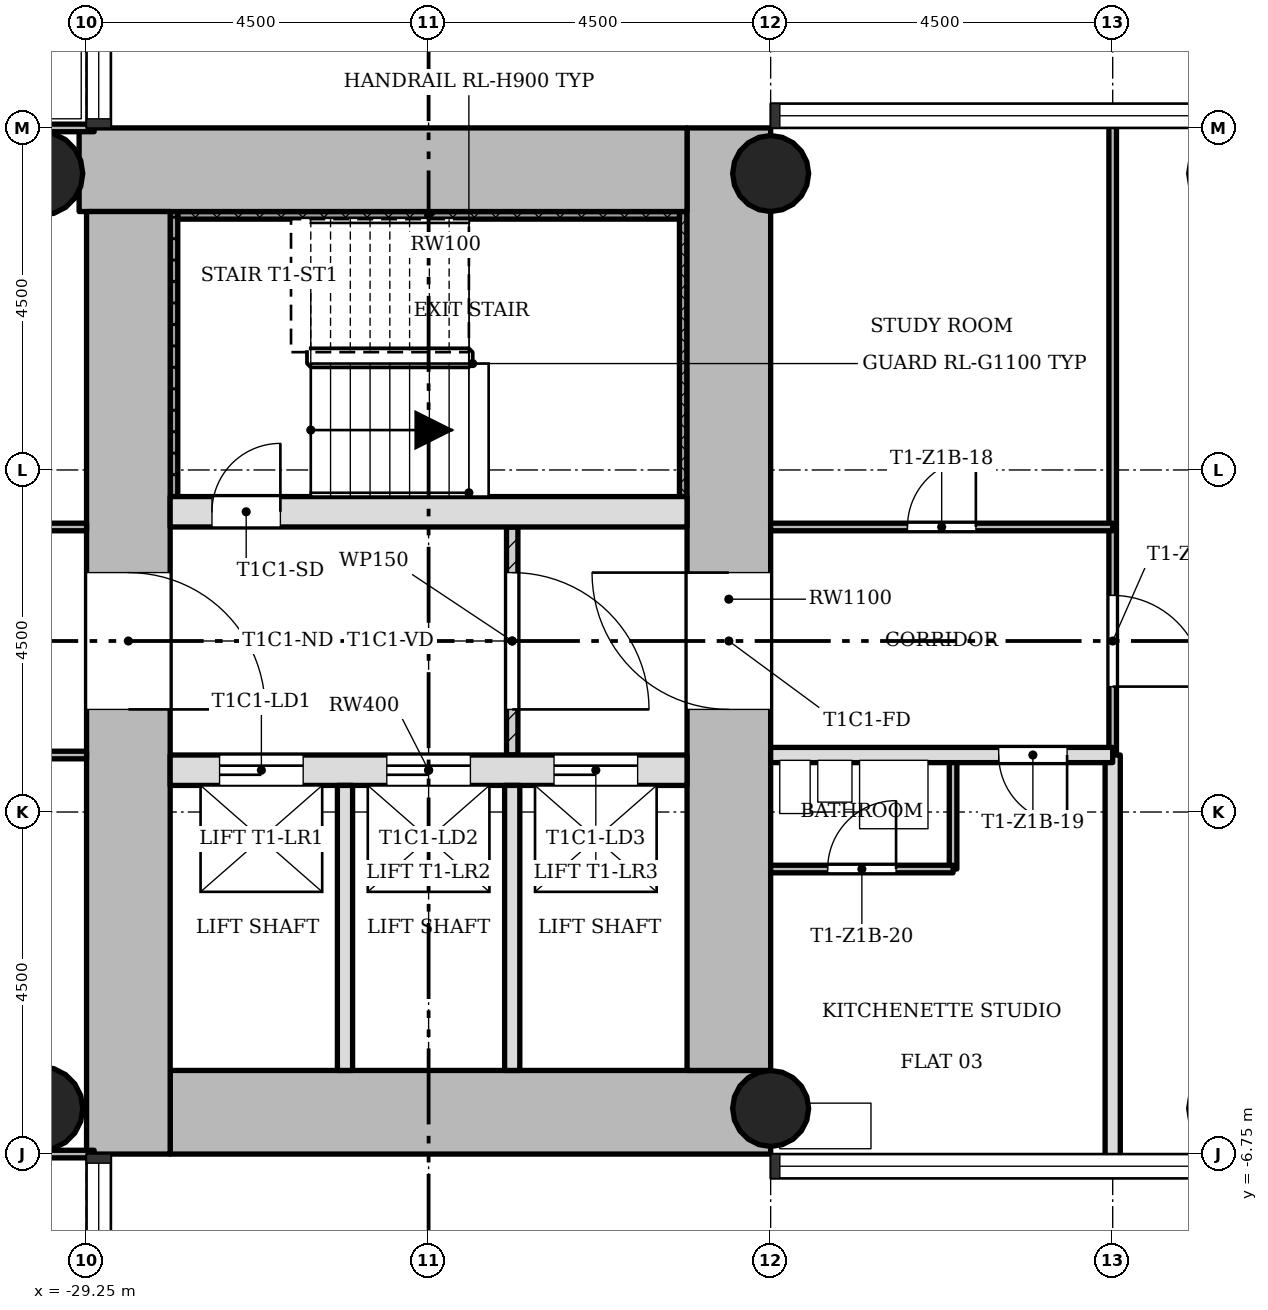
"""IFC4 building model, lengths in metres.
Left out: names, types, materials, properties, quantities, classifications, styles, units other than length and angle.
Written with IfcOpenShell. Run it as: python <this file> out.ifc"""

import sys

from ifc_helpers import new_model, si_unit, direction, frame, frame_2d, origin, origin_2d, place, context, subcontext, project, spatial, rectangle, hollow_circle, extrude, element, fill, save


model = new_model("IFC4")
c1 = context("Model", 3, precision=1e-05, world=origin(), true_north=direction((0.0, 1.0)))
c2 = subcontext(c1, "Body", "Model", "MODEL_VIEW")
j1 = project(units=[si_unit("LENGTHUNIT", "METRE"), si_unit("PLANEANGLEUNIT", "RADIAN")], contexts=[c1])
p1 = place(None, origin())
s1 = spatial("IfcSite", under=j1, at=p1, CompositionType="ELEMENT")
p2 = place(p1, origin())
s2 = spatial("IfcBuilding", under=s1, at=p2, CompositionType="ELEMENT")
p3 = place(p2, frame((0.0, 0.0, 34.7)))
s3 = spatial("IfcBuildingStorey", under=s2, at=p3, CompositionType="ELEMENT", Elevation=34.7)
p4 = place(p3, frame((-28.15, -6.2, 0.0), z_axis=(0.0, 0.0, 1.0), x_axis=(1.0, 0.0, 0.0)))
e1 = element("IfcWall", 1, at=p4, inside=s3, PredefinedType="SHEAR", context=c2, shape_type="SweptSolid", body=[
    extrude(rectangle(XDim=7.9, YDim=1.1, at=frame_2d((3.95, 0.0))), origin(), (0.0, 0.0, 1.0), 3.4),
])
p5 = place(p3, frame((-20.8, -5.65, 0.0), z_axis=(0.0, 0.0, 1.0), x_axis=(0.0, 1.0, 0.0)))
e2 = element("IfcWall", 2, at=p5, inside=s3, PredefinedType="SHEAR", context=c2, shape_type="SweptSolid", body=[
    extrude(rectangle(XDim=12.4, YDim=1.1, at=frame_2d((6.2, 0.0))), origin(), (0.0, 0.0, 1.0), 3.4),
])
p6 = place(p5, frame((4.75, 0.0, 0.0)))
e3 = element("IfcOpeningElement", 3, at=p6, cuts=e2, PredefinedType="OPENING", context=c2, shape_type="SweptSolid", body=[
    extrude(rectangle(XDim=1.8, YDim=2.1, at=frame_2d((0.9, 1.05))), frame((0.0, 0.56, 0.0), z_axis=(0.0, -1.0, 0.0), x_axis=(1.0, 0.0, 0.0)), (0.0, 0.0, 1.0), 1.12),
])
p7 = place(p3, frame((-21.35, 6.2, 0.0), z_axis=(0.0, 0.0, 1.0), x_axis=(-1.0, 0.0, 0.0)))
e4 = element("IfcWall", 4, at=p7, inside=s3, PredefinedType="SHEAR", context=c2, shape_type="SweptSolid", body=[
    extrude(rectangle(XDim=7.998, YDim=1.1, at=frame_2d((3.999, 0.0))), origin(), (0.0, 0.0, 1.0), 3.4),
])
p8 = place(p3, frame((-28.7, 5.65, 0.0), z_axis=(0.0, 0.0, 1.0), x_axis=(0.0, -1.0, 0.0)))
e5 = element("IfcWall", 5, at=p8, inside=s3, PredefinedType="SHEAR", context=c2, shape_type="SweptSolid", body=[
    extrude(rectangle(XDim=12.4, YDim=1.1, at=frame_2d((6.2, 0.0))), origin(), (0.0, 0.0, 1.0), 3.4),
])
p9 = place(p8, frame((4.75, 0.0, 0.0)))
e6 = element("IfcOpeningElement", 6, at=p9, cuts=e5, PredefinedType="OPENING", context=c2, shape_type="SweptSolid", body=[
    extrude(rectangle(XDim=1.8, YDim=2.1, at=frame_2d((0.9, 1.05))), frame((0.0, 0.56, 0.0), z_axis=(0.0, -1.0, 0.0), x_axis=(1.0, 0.0, 0.0)), (0.0, 0.0, 1.0), 1.12),
])
p10 = place(p3, frame((-28.15, -1.7, 0.0), z_axis=(0.0, 0.0, 1.0), x_axis=(1.0, 0.0, 0.0)))
e7 = element("IfcWall", 7, at=p10, inside=s3, PredefinedType="SHEAR", context=c2, shape_type="SweptSolid", body=[
    extrude(rectangle(XDim=6.8, YDim=0.4, at=frame_2d((3.4, 0.0))), origin(), (0.0, 0.0, 1.0), 3.4),
])
p11 = place(p10, frame((0.65, 0.0, 0.0)))
e8 = element("IfcOpeningElement", 8, at=p11, cuts=e7, PredefinedType="OPENING", context=c2, shape_type="SweptSolid", body=[
    extrude(rectangle(XDim=1.1, YDim=2.1, at=frame_2d((0.55, 1.05))), frame((0.0, 0.21, 0.0), z_axis=(0.0, -1.0, 0.0), x_axis=(1.0, 0.0, 0.0)), (0.0, 0.0, 1.0), 0.42),
])
p12 = place(p10, frame((2.85, 0.0, 0.0)))
e9 = element("IfcOpeningElement", 9, at=p12, cuts=e7, PredefinedType="OPENING", context=c2, shape_type="SweptSolid", body=[
    extrude(rectangle(XDim=1.1, YDim=2.1, at=frame_2d((0.55, 1.05))), frame((0.0, 0.21, 0.0), z_axis=(0.0, -1.0, 0.0), x_axis=(1.0, 0.0, 0.0)), (0.0, 0.0, 1.0), 0.42),
])
p13 = place(p10, frame((5.05, 0.0, 0.0)))
e10 = element("IfcOpeningElement", 10, at=p13, cuts=e7, PredefinedType="OPENING", context=c2, shape_type="SweptSolid", body=[
    extrude(rectangle(XDim=1.1, YDim=2.1, at=frame_2d((0.55, 1.05))), frame((0.0, 0.21, 0.0), z_axis=(0.0, -1.0, 0.0), x_axis=(1.0, 0.0, 0.0)), (0.0, 0.0, 1.0), 0.42),
])
p14 = place(p3, frame((-28.15, 1.7, 0.0), z_axis=(0.0, 0.0, 1.0), x_axis=(1.0, 0.0, 0.0)))
e11 = element("IfcWall", 11, at=p14, inside=s3, PredefinedType="SHEAR", context=c2, shape_type="SweptSolid", body=[
    extrude(rectangle(XDim=6.8, YDim=0.4, at=frame_2d((3.4, 0.0))), origin(), (0.0, 0.0, 1.0), 3.4),
])
p15 = place(p14, frame((0.55, 0.0, 0.0)))
e12 = element("IfcOpeningElement", 12, at=p15, cuts=e11, PredefinedType="OPENING", context=c2, shape_type="SweptSolid", body=[
    extrude(rectangle(XDim=0.9, YDim=2.1, at=frame_2d((0.45, 1.05))), frame((0.0, 0.21, 0.0), z_axis=(0.0, -1.0, 0.0), x_axis=(1.0, 0.0, 0.0)), (0.0, 0.0, 1.0), 0.42),
])
for number, where, z_axis, x_axis in (
    (13, (-20.25, -6.15, 0.0), (0.0, 0.0, 1.0), (1.0, 0.0, 0.0)),
    (14, (-20.25, 6.15, 0.0), (0.0, 0.0, 1.0), (1.0, 0.0, 0.0)),
):
    element("IfcColumn", number, at=place(p3, frame(where, z_axis=z_axis, x_axis=x_axis)), inside=s3, PredefinedType="COLUMN", context=c2, shape_type="SweptSolid", body=[
        extrude(hollow_circle(Radius=0.5, WallThickness=0.036, at=origin_2d()), origin(), (0.0, 0.0, 1.0), 3.4),
    ])
for number, where, z_axis, x_axis in (
    (15, (-29.85, -6.15, 0.0), (0.0, 0.0, 1.0), (1.0, 0.0, 0.0)),
    (16, (-29.85, 6.15, 0.0), (0.0, 0.0, 1.0), (1.0, 0.0, 0.0)),
):
    element("IfcColumn", number, at=place(p3, frame(where, z_axis=z_axis, x_axis=x_axis)), inside=s3, PredefinedType="COLUMN", context=c2, shape_type="SweptSolid", body=[
        extrude(hollow_circle(Radius=0.55, WallThickness=0.04, at=origin_2d()), origin(), (0.0, 0.0, 1.0), 3.4),
    ])
p16 = place(p3, frame((-23.65, -1.5, 0.0), z_axis=(0.0, 0.0, 1.0), x_axis=(0.0, 1.0, 0.0)))
e17 = element("IfcWall", 17, at=p16, inside=s3, PredefinedType="PARTITIONING", context=c2, shape_type="SweptSolid", body=[
    extrude(rectangle(XDim=3.0, YDim=0.15, at=frame_2d((1.5, 0.0))), origin(), (0.0, 0.0, 1.0), 3.0),
])
p17 = place(p16, frame((0.6, 0.0, 0.0)))
e18 = element("IfcOpeningElement", 18, at=p17, cuts=e17, PredefinedType="OPENING", context=c2, shape_type="SweptSolid", body=[
    extrude(rectangle(XDim=1.8, YDim=2.1, at=frame_2d((0.9, 1.05))), frame((0.0, 0.085, 0.0), z_axis=(0.0, -1.0, 0.0), x_axis=(1.0, 0.0, 0.0)), (0.0, 0.0, 1.0), 0.17),
])
for number, where, z_axis, x_axis in (
    (19, (-25.85, -5.65, 0.0), (0.0, 0.0, 1.0), (0.0, 1.0, 0.0)),
    (20, (-23.65, -5.65, 0.0), (0.0, 0.0, 1.0), (0.0, 1.0, 0.0)),
):
    element("IfcWall", number, at=place(p3, frame(where, z_axis=z_axis, x_axis=x_axis)), inside=s3, PredefinedType="SOLIDWALL", context=c2, shape_type="SweptSolid", body=[
        extrude(rectangle(XDim=3.75, YDim=0.2, at=frame_2d((1.875, 0.0))), origin(), (0.0, 0.0, 1.0), 3.0),
    ])
p18 = place(p3, frame((-17.85, -3.0, 0.0), z_axis=(0.0, 0.0, 1.0), x_axis=(0.0, 1.0, 0.0)))
e21 = element("IfcWall", 21, at=p18, inside=s3, PredefinedType="PARTITIONING", context=c2, shape_type="SweptSolid", body=[
    extrude(rectangle(XDim=1.5, YDim=0.1, at=frame_2d((0.75, 0.0))), origin(), (0.0, 0.0, 1.0), 3.0),
])
p19 = place(p3, frame((-15.75, -1.5, 0.0), z_axis=(0.0, 0.0, 1.0), x_axis=(0.0, 1.0, 0.0)))
e22 = element("IfcWall", 22, at=p19, inside=s3, PredefinedType="PARTITIONING", context=c2, shape_type="SweptSolid", body=[
    extrude(rectangle(XDim=8.35, YDim=0.1, at=frame_2d((4.175, 0.0))), origin(), (0.0, 0.0, 1.0), 3.0),
])
p20 = place(p19, frame((0.9, 0.0, 0.0)))
e23 = element("IfcOpeningElement", 23, at=p20, cuts=e22, PredefinedType="OPENING", context=c2, shape_type="SweptSolid", body=[
    extrude(rectangle(XDim=1.2, YDim=2.1, at=frame_2d((0.6, 1.05))), frame((0.0, 0.06, 0.0), z_axis=(0.0, -1.0, 0.0), x_axis=(1.0, 0.0, 0.0)), (0.0, 0.0, 1.0), 0.12),
])
p21 = place(p3, frame((-15.75, -6.85, 0.0), z_axis=(0.0, 0.0, 1.0), x_axis=(0.0, 1.0, 0.0)))
e24 = element("IfcWall", 24, at=p21, inside=s3, PredefinedType="SOLIDWALL", context=c2, shape_type="SweptSolid", body=[
    extrude(rectangle(XDim=5.35, YDim=0.2, at=frame_2d((2.675, 0.0))), origin(), (0.0, 0.0, 1.0), 3.0),
])
p22 = place(p3, frame((-35.1, -6.75, 0.0), z_axis=(0.0, 0.0, 1.0), x_axis=(1.0, 0.0, 0.0)))
e25 = element("IfcWall", 25, at=p22, inside=s3, PredefinedType="PARTITIONING", context=c2, shape_type="SweptSolid", body=[
    extrude(rectangle(XDim=5.95, YDim=0.1, at=frame_2d((2.975, 0.0))), origin(), (0.0, 0.0, 1.0), 3.0),
])
p23 = place(p3, frame((-20.25, -3.0, 0.0), z_axis=(0.0, 0.0, 1.0), x_axis=(1.0, 0.0, 0.0)))
e26 = element("IfcWall", 26, at=p23, inside=s3, PredefinedType="PARTITIONING", context=c2, shape_type="SweptSolid", body=[
    extrude(rectangle(XDim=2.4, YDim=0.1, at=frame_2d((1.2, 0.0))), origin(), (0.0, 0.0, 1.0), 3.0),
])
p24 = place(p23, frame((0.75, 0.0, 0.0)))
e27 = element("IfcOpeningElement", 27, at=p24, cuts=e26, PredefinedType="OPENING", context=c2, shape_type="SweptSolid", body=[
    extrude(rectangle(XDim=0.9, YDim=2.1, at=frame_2d((0.45, 1.05))), frame((0.0, 0.06, 0.0), z_axis=(0.0, -1.0, 0.0), x_axis=(1.0, 0.0, 0.0)), (0.0, 0.0, 1.0), 0.12),
])
p25 = place(p3, frame((-35.1, -1.5, 0.0), z_axis=(0.0, 0.0, 1.0), x_axis=(1.0, 0.0, 0.0)))
e28 = element("IfcWall", 28, at=p25, inside=s3, PredefinedType="PARTITIONING", context=c2, shape_type="SweptSolid", body=[
    extrude(rectangle(XDim=5.85, YDim=0.1, at=frame_2d((2.925, 0.0))), origin(), (0.0, 0.0, 1.0), 3.0),
])
p26 = place(p25, frame((2.475, 0.0, 0.0)))
e29 = element("IfcOpeningElement", 29, at=p26, cuts=e28, PredefinedType="OPENING", context=c2, shape_type="SweptSolid", body=[
    extrude(rectangle(XDim=0.9, YDim=2.1, at=frame_2d((0.45, 1.05))), frame((0.0, 0.06, 0.0), z_axis=(0.0, -1.0, 0.0), x_axis=(1.0, 0.0, 0.0)), (0.0, 0.0, 1.0), 0.12),
])
p27 = place(p3, frame((-20.25, -1.5, 0.0), z_axis=(0.0, 0.0, 1.0), x_axis=(1.0, 0.0, 0.0)))
e30 = element("IfcWall", 30, at=p27, inside=s3, PredefinedType="SOLIDWALL", context=c2, shape_type="SweptSolid", body=[
    extrude(rectangle(XDim=4.5, YDim=0.2, at=frame_2d((2.25, 0.0))), origin(), (0.0, 0.0, 1.0), 3.0),
])
p28 = place(p27, frame((3.0, 0.0, 0.0)))
e31 = element("IfcOpeningElement", 31, at=p28, cuts=e30, PredefinedType="OPENING", context=c2, shape_type="SweptSolid", body=[
    extrude(rectangle(XDim=0.9, YDim=2.1, at=frame_2d((0.45, 1.05))), frame((0.0, 0.11, 0.0), z_axis=(0.0, -1.0, 0.0), x_axis=(1.0, 0.0, 0.0)), (0.0, 0.0, 1.0), 0.22),
])
p29 = place(p3, frame((-35.1, 1.5, 0.0), z_axis=(0.0, 0.0, 1.0), x_axis=(1.0, 0.0, 0.0)))
e32 = element("IfcWall", 32, at=p29, inside=s3, PredefinedType="PARTITIONING", context=c2, shape_type="SweptSolid", body=[
    extrude(rectangle(XDim=5.85, YDim=0.1, at=frame_2d((2.925, 0.0))), origin(), (0.0, 0.0, 1.0), 3.0),
])
p30 = place(p29, frame((3.375, 0.0, 0.0)))
e33 = element("IfcOpeningElement", 33, at=p30, cuts=e32, PredefinedType="OPENING", context=c2, shape_type="SweptSolid", body=[
    extrude(rectangle(XDim=0.9, YDim=2.1, at=frame_2d((0.45, 1.05))), frame((0.0, 0.06, 0.0), z_axis=(0.0, -1.0, 0.0), x_axis=(1.0, 0.0, 0.0)), (0.0, 0.0, 1.0), 0.12),
])
p31 = place(p3, frame((-20.25, 1.5, 0.0), z_axis=(0.0, 0.0, 1.0), x_axis=(1.0, 0.0, 0.0)))
e34 = element("IfcWall", 34, at=p31, inside=s3, PredefinedType="PARTITIONING", context=c2, shape_type="SweptSolid", body=[
    extrude(rectangle(XDim=4.5, YDim=0.1, at=frame_2d((2.25, 0.0))), origin(), (0.0, 0.0, 1.0), 3.0),
])
p32 = place(p31, frame((1.8, 0.0, 0.0)))
e35 = element("IfcOpeningElement", 35, at=p32, cuts=e34, PredefinedType="OPENING", context=c2, shape_type="SweptSolid", body=[
    extrude(rectangle(XDim=0.9, YDim=2.1, at=frame_2d((0.45, 1.05))), frame((0.0, 0.06, 0.0), z_axis=(0.0, -1.0, 0.0), x_axis=(1.0, 0.0, 0.0)), (0.0, 0.0, 1.0), 0.12),
])
p33 = place(p3, frame((-35.1, 6.75, 0.0), z_axis=(0.0, 0.0, 1.0), x_axis=(1.0, 0.0, 0.0)))
e36 = element("IfcWall", 36, at=p33, inside=s3, PredefinedType="PARTITIONING", context=c2, shape_type="SweptSolid", body=[
    extrude(rectangle(XDim=5.95, YDim=0.1, at=frame_2d((2.975, 0.0))), origin(), (0.0, 0.0, 1.0), 3.0),
])
p34 = place(p3, frame((-21.4, 1.9, 0.0), z_axis=(0.0, 0.0, 1.0), x_axis=(0.0, 1.0, 0.0)))
e37 = element("IfcWall", 37, at=p34, inside=s3, PredefinedType="SHEAR", context=c2, shape_type="SweptSolid", body=[
    extrude(rectangle(XDim=3.75, YDim=0.1, at=frame_2d((1.875, 0.0))), origin(), (0.0, 0.0, 1.0), 3.4),
])
p35 = place(p3, frame((-28.05, 5.6, 0.0), z_axis=(0.0, 0.0, 1.0), x_axis=(1.0, 0.0, 0.0)))
e38 = element("IfcWall", 38, at=p35, inside=s3, PredefinedType="SHEAR", context=c2, shape_type="SweptSolid", body=[
    extrude(rectangle(XDim=6.6, YDim=0.1, at=frame_2d((3.3, 0.0))), origin(), (0.0, 0.0, 1.0), 3.4),
])
p36 = place(p3, frame((-28.1, 1.9, 0.0), z_axis=(0.0, 0.0, 1.0), x_axis=(0.0, 1.0, 0.0)))
e39 = element("IfcWall", 39, at=p36, inside=s3, PredefinedType="SHEAR", context=c2, shape_type="SweptSolid", body=[
    extrude(rectangle(XDim=3.75, YDim=0.1, at=frame_2d((1.875, 0.0))), origin(), (0.0, 0.0, 1.0), 3.4),
])
p37 = place(p17, origin())
e40 = element("IfcDoor", 40, at=p37, inside=s3, OperationType="SINGLE_SWING_LEFT", PredefinedType="DOOR", context=c2, shape_type="SweptSolid", body=[
    extrude(rectangle(XDim=1.8, YDim=2.1, at=frame_2d((0.9, 1.05))), frame((0.0, 0.025, 0.0), z_axis=(0.0, -1.0, 0.0), x_axis=(1.0, 0.0, 0.0)), (0.0, 0.0, 1.0), 0.05),
])
fill(e18, e40)
p38 = place(p32, origin())
e41 = element("IfcDoor", 41, at=p38, inside=s3, OperationType="SINGLE_SWING_LEFT", PredefinedType="DOOR", context=c2, shape_type="SweptSolid", body=[
    extrude(rectangle(XDim=0.9, YDim=2.1, at=frame_2d((0.45, 1.05))), frame((0.0, 0.025, 0.0), z_axis=(0.0, -1.0, 0.0), x_axis=(1.0, 0.0, 0.0)), (0.0, 0.0, 1.0), 0.05),
])
fill(e35, e41)
p39 = place(p28, origin())
e42 = element("IfcDoor", 42, at=p39, inside=s3, OperationType="SINGLE_SWING_RIGHT", PredefinedType="DOOR", context=c2, shape_type="SweptSolid", body=[
    extrude(rectangle(XDim=0.9, YDim=2.1, at=frame_2d((0.45, 1.05))), frame((0.0, 0.025, 0.0), z_axis=(0.0, -1.0, 0.0), x_axis=(1.0, 0.0, 0.0)), (0.0, 0.0, 1.0), 0.05),
])
fill(e31, e42)
p40 = place(p24, origin())
e43 = element("IfcDoor", 43, at=p40, inside=s3, OperationType="SINGLE_SWING_LEFT", PredefinedType="DOOR", context=c2, shape_type="SweptSolid", body=[
    extrude(rectangle(XDim=0.9, YDim=2.1, at=frame_2d((0.45, 1.05))), frame((0.0, 0.025, 0.0), z_axis=(0.0, -1.0, 0.0), x_axis=(1.0, 0.0, 0.0)), (0.0, 0.0, 1.0), 0.05),
])
fill(e27, e43)
p41 = place(p20, origin())
e44 = element("IfcDoor", 44, at=p41, inside=s3, OperationType="SINGLE_SWING_LEFT", PredefinedType="DOOR", context=c2, shape_type="SweptSolid", body=[
    extrude(rectangle(XDim=1.2, YDim=2.1, at=frame_2d((0.6, 1.05))), frame((0.0, 0.025, 0.0), z_axis=(0.0, -1.0, 0.0), x_axis=(1.0, 0.0, 0.0)), (0.0, 0.0, 1.0), 0.05),
])
fill(e23, e44)
p42 = place(p15, origin())
e45 = element("IfcDoor", 45, at=p42, inside=s3, OperationType="SINGLE_SWING_LEFT", PredefinedType="DOOR", context=c2, shape_type="SweptSolid", body=[
    extrude(rectangle(XDim=0.9, YDim=2.1, at=frame_2d((0.45, 1.05))), frame((0.0, 0.025, 0.0), z_axis=(0.0, -1.0, 0.0), x_axis=(1.0, 0.0, 0.0)), (0.0, 0.0, 1.0), 0.05),
])
fill(e12, e45)
p43 = place(p11, origin())
e46 = element("IfcDoor", 46, at=p43, inside=s3, OperationType="SLIDING_TO_LEFT", PredefinedType="DOOR", context=c2, shape_type="SweptSolid", body=[
    extrude(rectangle(XDim=1.1, YDim=2.1, at=frame_2d((0.55, 1.05))), frame((0.0, 0.025, 0.0), z_axis=(0.0, -1.0, 0.0), x_axis=(1.0, 0.0, 0.0)), (0.0, 0.0, 1.0), 0.05),
])
fill(e8, e46)
p44 = place(p12, origin())
e47 = element("IfcDoor", 47, at=p44, inside=s3, OperationType="SLIDING_TO_LEFT", PredefinedType="DOOR", context=c2, shape_type="SweptSolid", body=[
    extrude(rectangle(XDim=1.1, YDim=2.1, at=frame_2d((0.55, 1.05))), frame((0.0, 0.025, 0.0), z_axis=(0.0, -1.0, 0.0), x_axis=(1.0, 0.0, 0.0)), (0.0, 0.0, 1.0), 0.05),
])
fill(e9, e47)
p45 = place(p13, origin())
e48 = element("IfcDoor", 48, at=p45, inside=s3, OperationType="SLIDING_TO_LEFT", PredefinedType="DOOR", context=c2, shape_type="SweptSolid", body=[
    extrude(rectangle(XDim=1.1, YDim=2.1, at=frame_2d((0.55, 1.05))), frame((0.0, 0.025, 0.0), z_axis=(0.0, -1.0, 0.0), x_axis=(1.0, 0.0, 0.0)), (0.0, 0.0, 1.0), 0.05),
])
fill(e10, e48)
p46 = place(p9, origin())
e49 = element("IfcDoor", 49, at=p46, inside=s3, OperationType="SINGLE_SWING_LEFT", PredefinedType="DOOR", context=c2, shape_type="SweptSolid", body=[
    extrude(rectangle(XDim=1.8, YDim=2.1, at=frame_2d((0.9, 1.05))), frame((0.0, 0.025, 0.0), z_axis=(0.0, -1.0, 0.0), x_axis=(1.0, 0.0, 0.0)), (0.0, 0.0, 1.0), 0.05),
])
fill(e6, e49)
p47 = place(p6, origin())
e50 = element("IfcDoor", 50, at=p47, inside=s3, OperationType="SINGLE_SWING_LEFT", PredefinedType="DOOR", context=c2, shape_type="SweptSolid", body=[
    extrude(rectangle(XDim=1.8, YDim=2.1, at=frame_2d((0.9, 1.05))), frame((0.0, 0.025, 0.0), z_axis=(0.0, -1.0, 0.0), x_axis=(1.0, 0.0, 0.0)), (0.0, 0.0, 1.0), 0.05),
])
fill(e3, e50)
save(model, sys.argv[1])
